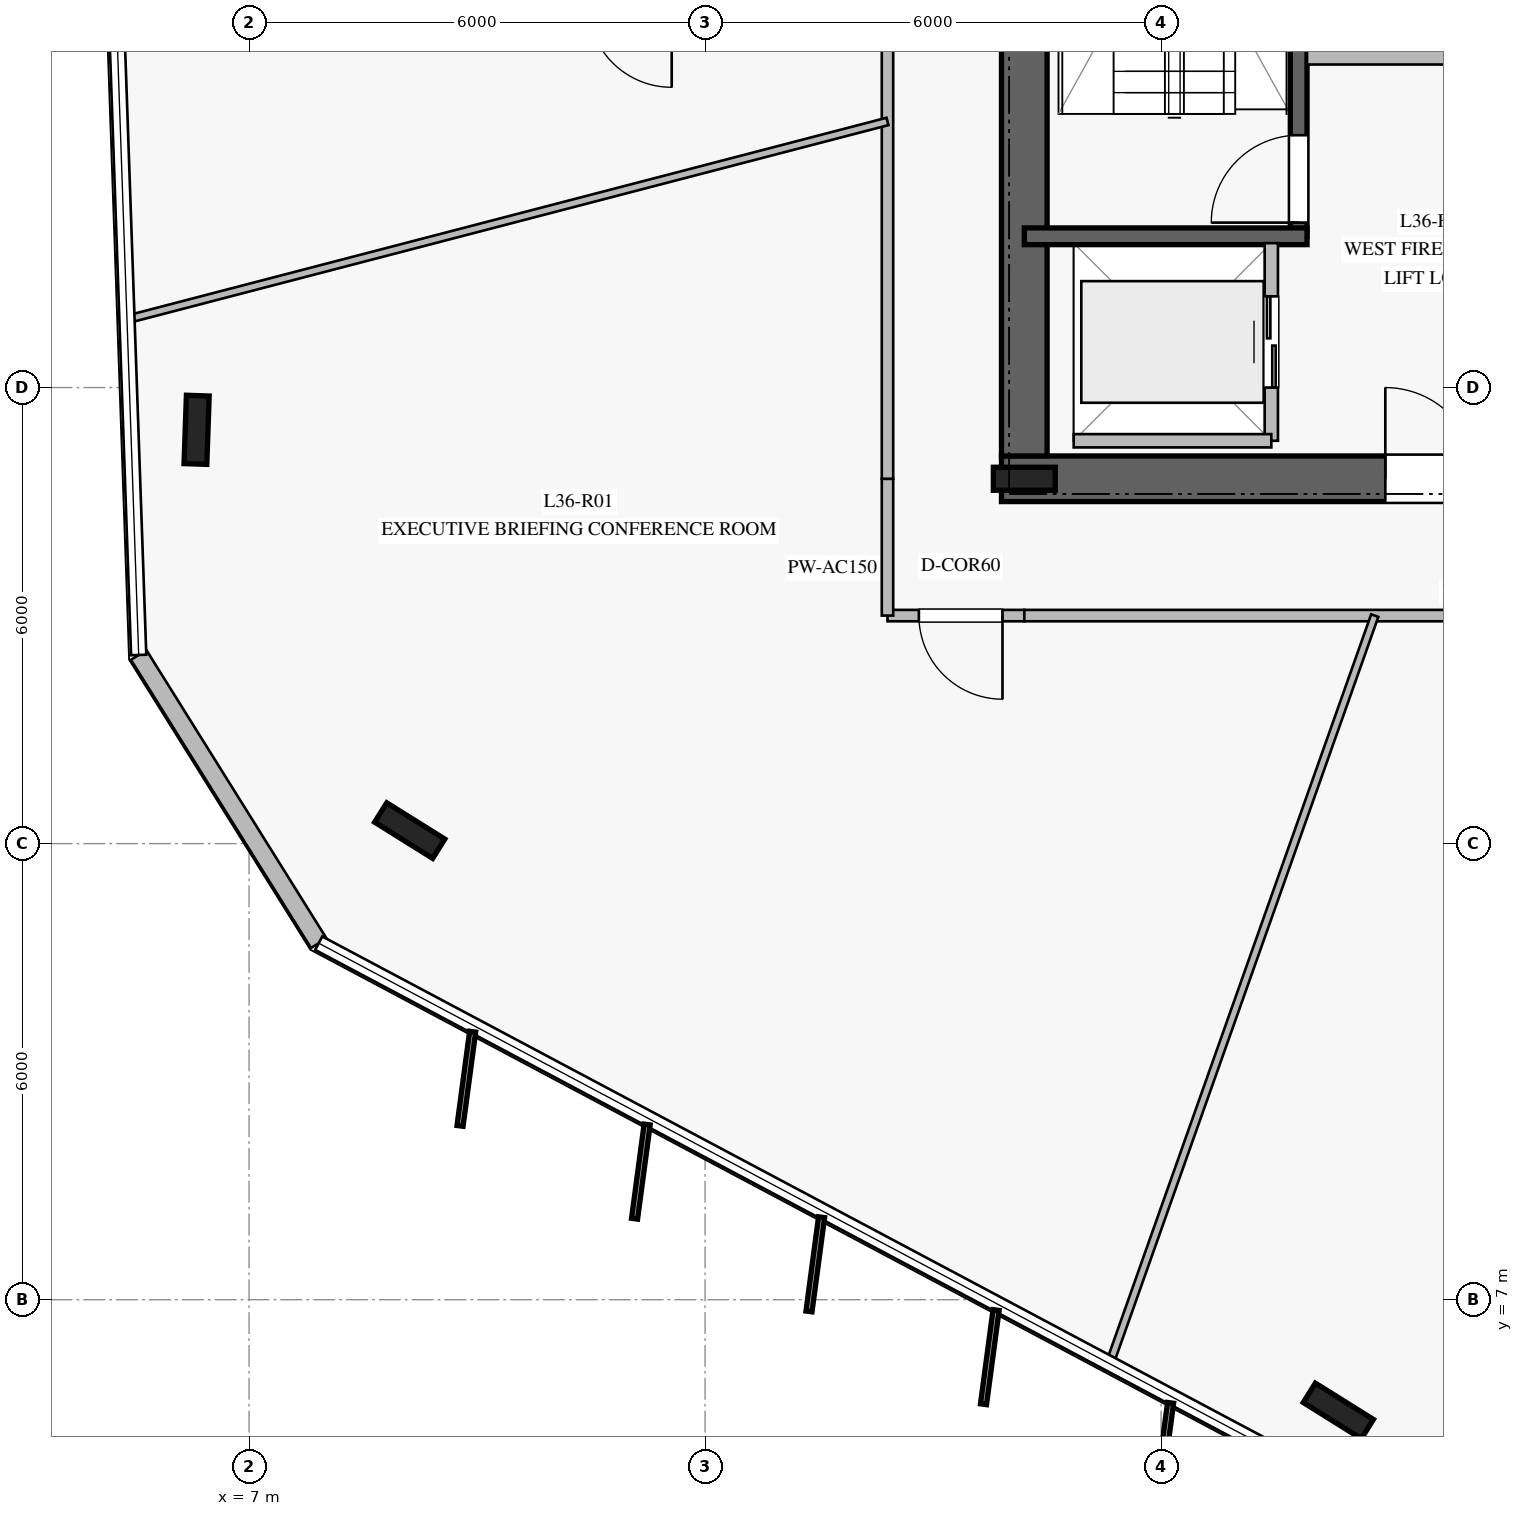
"""IFC4 building model, lengths in metres.
Left out: names, types, materials, properties, quantities, classifications, styles, units other than length and angle.
Written with IfcOpenShell. Run it as: python <this file> out.ifc"""

import sys

from ifc_helpers import new_model, si_unit, direction, frame, frame_2d, origin, origin_2d, place, context, subcontext, project, spatial, rectangle, i_section, extrude, element, fill, save


model = new_model("IFC4")
c1 = context("Model", 3, precision=1e-05, world=origin(), true_north=direction((0.0, 1.0)))
c2 = subcontext(c1, "Body", "Model", "MODEL_VIEW")
j1 = project(units=[si_unit("LENGTHUNIT", "METRE"), si_unit("PLANEANGLEUNIT", "RADIAN")], contexts=[c1])
p1 = place(None, origin())
s1 = spatial("IfcSite", under=j1, at=p1, CompositionType="ELEMENT")
p2 = place(p1, origin())
s2 = spatial("IfcBuilding", under=s1, at=p2, CompositionType="ELEMENT")
p3 = place(p2, frame((0.0, 0.0, 150.4)))
s3 = spatial("IfcBuildingStorey", under=s2, at=p3, CompositionType="ELEMENT", Elevation=150.4)
p4 = place(p3, frame((16.9, 17.8, 0.0), z_axis=(0.0, 0.0, 1.0), x_axis=(1.0, 0.0, 0.0)))
e1 = element("IfcWall", 1, at=p4, inside=s3, PredefinedType="SHEAR", context=c2, shape_type="SweptSolid", body=[
    extrude(rectangle(XDim=16.2, YDim=0.6, at=frame_2d((8.1, 0.0))), origin(), (0.0, 0.0, 1.0), 3.76),
])
p5 = place(p4, frame((5.05, 0.0, 0.0)))
e2 = element("IfcOpeningElement", 2, at=p5, cuts=e1, PredefinedType="OPENING", context=c2, shape_type="SweptSolid", body=[
    extrude(rectangle(XDim=1.2, YDim=2.25, at=frame_2d((0.6, 1.125))), frame((0.0, 0.31, 0.0), z_axis=(0.0, -1.0, 0.0), x_axis=(1.0, 0.0, 0.0)), (0.0, 0.0, 1.0), 0.62),
])
p6 = place(p4, frame((10.95, 0.0, 0.0)))
e3 = element("IfcOpeningElement", 3, at=p6, cuts=e1, PredefinedType="OPENING", context=c2, shape_type="SweptSolid", body=[
    extrude(rectangle(XDim=1.1, YDim=2.2, at=frame_2d((0.55, 1.1))), frame((0.0, 0.31, 0.0), z_axis=(0.0, -1.0, 0.0), x_axis=(1.0, 0.0, 0.0)), (0.0, 0.0, 1.0), 0.62),
])
p7 = place(p3, frame((17.2, 31.9, 0.0), z_axis=(0.0, 0.0, 1.0), x_axis=(0.0, -1.0, 0.0)))
e4 = element("IfcWall", 4, at=p7, inside=s3, PredefinedType="SHEAR", context=c2, shape_type="SweptSolid", body=[
    extrude(rectangle(XDim=13.8, YDim=0.6, at=frame_2d((6.9, 0.0))), origin(), (0.0, 0.0, 1.0), 3.76),
])
p8 = place(p7, frame((2.05, 0.0, 0.0)))
e5 = element("IfcOpeningElement", 5, at=p8, cuts=e4, PredefinedType="OPENING", context=c2, shape_type="SweptSolid", body=[
    extrude(rectangle(XDim=1.5, YDim=2.2, at=frame_2d((0.75, 1.1))), frame((0.0, 0.31, 0.0), z_axis=(0.0, -1.0, 0.0), x_axis=(1.0, 0.0, 0.0)), (0.0, 0.0, 1.0), 0.62),
])
p9 = place(p3, frame((17.2, 17.8, 0.0), z_axis=(0.0, 0.0, 1.0), x_axis=(1.0, 0.0, 0.0)))
e6 = element("IfcColumn", 6, at=p9, inside=s3, PredefinedType="COLUMN", context=c2, shape_type="SweptSolid", body=[
    extrude(i_section(OverallWidth=0.303, OverallDepth=0.814, WebThickness=0.021, FlangeThickness=0.04, at=origin_2d()), origin(), (0.0, 0.0, 1.0), 4.0),
])
p10 = place(p3, frame((20.81, 20.99, 0.0), z_axis=(0.0, 0.0, 1.0), x_axis=(0.0, 1.0, 0.0)))
e7 = element("IfcWall", 7, at=p10, inside=s3, PredefinedType="SOLIDWALL", context=c2, shape_type="SweptSolid", body=[
    extrude(rectangle(XDim=7.22, YDim=0.22, at=frame_2d((3.61, 0.0))), origin(), (0.0, 0.0, 1.0), 3.76),
])
p11 = place(p10, frame((0.18, 0.0, 0.0)))
e8 = element("IfcOpeningElement", 8, at=p11, cuts=e7, PredefinedType="OPENING", context=c2, shape_type="SweptSolid", body=[
    extrude(rectangle(XDim=1.15, YDim=2.2, at=frame_2d((0.575, 1.1))), frame((0.0, 0.12, 0.0), z_axis=(0.0, -1.0, 0.0), x_axis=(1.0, 0.0, 0.0)), (0.0, 0.0, 1.0), 0.24),
])
p12 = place(p3, frame((17.2, 20.99, 0.0), z_axis=(0.0, 0.0, 1.0), x_axis=(1.0, 0.0, 0.0)))
e9 = element("IfcWall", 9, at=p12, inside=s3, PredefinedType="SOLIDWALL", context=c2, shape_type="SweptSolid", body=[
    extrude(rectangle(XDim=3.72, YDim=0.22, at=frame_2d((1.86, 0.0))), origin(), (0.0, 0.0, 1.0), 3.76),
])
for number, where, z_axis, x_axis in (
    (10, (6.31, 18.444, 0.0), (0.0, 0.0, 1.0), (0.035, 0.999, 0.0)),
    (11, (9.114, 13.171, 0.0), (0.0, 0.0, 1.0), (-0.848, 0.53, 0.0)),
    (12, (21.332, 5.536, 0.0), (0.0, 0.0, 1.0), (-0.848, 0.53, 0.0)),
):
    element("IfcColumn", number, at=place(p3, frame(where, z_axis=z_axis, x_axis=x_axis)), inside=s3, PredefinedType="COLUMN", context=c2, shape_type="SweptSolid", body=[
        extrude(i_section(OverallWidth=0.3, OverallDepth=0.9, WebThickness=0.019, FlangeThickness=0.035, at=origin_2d()), origin(), (0.0, 0.0, 1.0), 4.0),
    ])
p13 = place(p3, frame((5.548, 15.482, 0.0), z_axis=(0.0, 0.0, 1.0), x_axis=(0.529822232534, -0.848108720573, 0.0)))
e13 = element("IfcWall", 13, at=p13, inside=s3, PredefinedType="STANDARD", context=c2, shape_type="SweptSolid", body=[
    extrude(rectangle(XDim=4.471, YDim=0.24, at=frame_2d((2.236, 0.0))), origin(), (0.0, 0.0, 1.0), 3.76),
])
p14 = place(p3, frame((20.92, 23.35, 0.0), z_axis=(0.0, 0.0, 1.0), x_axis=(1.0, 0.0, 0.0)))
e14 = element("IfcWall", 14, at=p14, inside=s3, PredefinedType="PARTITIONING", context=c2, shape_type="SweptSolid", body=[
    extrude(rectangle(XDim=3.38, YDim=0.2, at=frame_2d((1.69, 0.0))), origin(), (0.0, 0.0, 1.0), 3.76),
])
p15 = place(p3, frame((20.45, 18.3, 0.0), z_axis=(0.0, 0.0, 1.0), x_axis=(0.0, 1.0, 0.0)))
e15 = element("IfcWall", 15, at=p15, inside=s3, PredefinedType="PARTITIONING", context=c2, shape_type="SweptSolid", body=[
    extrude(rectangle(XDim=2.6, YDim=0.175, at=frame_2d((1.3, 0.0))), origin(), (0.0, 0.0, 1.0), 3.76),
])
p16 = place(p15, frame((0.7, 0.0, 0.0)))
e16 = element("IfcOpeningElement", 16, at=p16, cuts=e15, PredefinedType="OPENING", context=c2, shape_type="SweptSolid", body=[
    extrude(rectangle(XDim=1.2, YDim=2.2, at=frame_2d((0.6, 1.1))), frame((0.0, 0.098, 0.0), z_axis=(0.0, -1.0, 0.0), x_axis=(1.0, 0.0, 0.0)), (0.0, 0.0, 1.0), 0.195),
])
p17 = place(p3, frame((17.85, 18.3, 0.0), z_axis=(0.0, 0.0, 1.0), x_axis=(1.0, 0.0, 0.0)))
e17 = element("IfcWall", 17, at=p17, inside=s3, PredefinedType="PARTITIONING", context=c2, shape_type="SweptSolid", body=[
    extrude(rectangle(XDim=2.6, YDim=0.175, at=frame_2d((1.3, 0.0))), origin(), (0.0, 0.0, 1.0), 3.76),
])
p18 = place(p3, frame((17.2, 16.0, 0.0), z_axis=(0.0, 0.0, 1.0), x_axis=(-1.0, 0.0, 0.0)))
e18 = element("IfcWall", 18, at=p18, inside=s3, PredefinedType="PARTITIONING", context=c2, shape_type="SweptSolid", body=[
    extrude(rectangle(XDim=1.8, YDim=0.15, at=frame_2d((0.9, 0.0))), origin(), (0.0, 0.0, 1.0), 3.36),
])
p19 = place(p18, frame((0.287, 0.0, 0.0)))
e19 = element("IfcOpeningElement", 19, at=p19, cuts=e18, PredefinedType="OPENING", context=c2, shape_type="SweptSolid", body=[
    extrude(rectangle(XDim=1.1, YDim=2.2, at=frame_2d((0.55, 1.1))), frame((0.0, 0.085, 0.0), z_axis=(0.0, -1.0, 0.0), x_axis=(1.0, 0.0, 0.0)), (0.0, 0.0, 1.0), 0.17),
])
p20 = place(p3, frame((15.4, 16.0, 0.0), z_axis=(0.0, 0.0, 1.0), x_axis=(0.0, 1.0, 0.0)))
e20 = element("IfcWall", 20, at=p20, inside=s3, PredefinedType="PARTITIONING", context=c2, shape_type="SweptSolid", body=[
    extrude(rectangle(XDim=1.8, YDim=0.15, at=frame_2d((0.9, 0.0))), origin(), (0.0, 0.0, 1.0), 3.21),
])
p21 = place(p3, frame((15.4, 17.8, 0.0), z_axis=(0.0, 0.0, 1.0), x_axis=(0.0, 1.0, 0.0)))
e21 = element("IfcWall", 21, at=p21, inside=s3, PredefinedType="PARTITIONING", context=c2, shape_type="SweptSolid", body=[
    extrude(rectangle(XDim=6.25, YDim=0.15, at=frame_2d((3.125, 0.0))), origin(), (0.0, 0.0, 1.0), 3.21),
])
p22 = place(p3, frame((24.05, 16.0, 0.0), z_axis=(0.0, 0.0, 1.0), x_axis=(-1.0, 0.0, 0.0)))
e22 = element("IfcWall", 22, at=p22, inside=s3, PredefinedType="PARTITIONING", context=c2, shape_type="SweptSolid", body=[
    extrude(rectangle(XDim=6.85, YDim=0.15, at=frame_2d((3.425, 0.0))), origin(), (0.0, 0.0, 1.0), 3.21),
])
p23 = place(p3, frame((15.4, 22.501, 0.0), z_axis=(0.0, 0.0, 1.0), x_axis=(-0.96772970211, -0.251990522945, 0.0)))
e23 = element("IfcWall", 23, at=p23, inside=s3, PredefinedType="MOVABLE", context=c2, shape_type="SweptSolid", body=[
    extrude(rectangle(XDim=10.322, YDim=0.1, at=frame_2d((5.161, 0.0))), origin(), (0.0, 0.0, 1.0), 3.05),
])
p24 = place(p3, frame((21.811, 16.0, 0.0), z_axis=(0.0, 0.0, 1.0), x_axis=(-0.333981087617, -0.942579775464, 0.0)))
e24 = element("IfcWall", 24, at=p24, inside=s3, PredefinedType="MOVABLE", context=c2, shape_type="SweptSolid", body=[
    extrude(rectangle(XDim=10.426, YDim=0.1, at=frame_2d((5.213, 0.0))), origin(), (0.0, 0.0, 1.0), 3.16),
])
p25 = place(p11, origin())
e25 = element("IfcDoor", 25, at=p25, inside=s3, OperationType="SINGLE_SWING_LEFT", PredefinedType="DOOR", context=c2, shape_type="SweptSolid", body=[
    extrude(rectangle(XDim=1.15, YDim=2.2, at=frame_2d((0.575, 1.1))), frame((0.0, 0.025, 0.0), z_axis=(0.0, -1.0, 0.0), x_axis=(1.0, 0.0, 0.0)), (0.0, 0.0, 1.0), 0.05),
])
fill(e8, e25)
p26 = place(p5, origin())
e26 = element("IfcDoor", 26, at=p26, inside=s3, OperationType="SINGLE_SWING_LEFT", PredefinedType="DOOR", context=c2, shape_type="SweptSolid", body=[
    extrude(rectangle(XDim=1.2, YDim=2.25, at=frame_2d((0.6, 1.125))), frame((0.0, 0.025, 0.0), z_axis=(0.0, -1.0, 0.0), x_axis=(1.0, 0.0, 0.0)), (0.0, 0.0, 1.0), 0.05),
])
fill(e2, e26)
p27 = place(p16, origin())
e27 = element("IfcDoor", 27, at=p27, inside=s3, OperationType="DOUBLE_DOOR_SLIDING", PredefinedType="DOOR", context=c2, shape_type="SweptSolid", body=[
    extrude(rectangle(XDim=1.2, YDim=2.2, at=frame_2d((0.6, 1.1))), frame((0.0, 0.025, 0.0), z_axis=(0.0, -1.0, 0.0), x_axis=(1.0, 0.0, 0.0)), (0.0, 0.0, 1.0), 0.05),
])
fill(e16, e27)
p28 = place(p19, origin())
e28 = element("IfcDoor", 28, at=p28, inside=s3, OperationType="SINGLE_SWING_LEFT", PredefinedType="DOOR", context=c2, shape_type="SweptSolid", body=[
    extrude(rectangle(XDim=1.1, YDim=2.2, at=frame_2d((0.55, 1.1))), frame((0.0, 0.025, 0.0), z_axis=(0.0, -1.0, 0.0), x_axis=(1.0, 0.0, 0.0)), (0.0, 0.0, 1.0), 0.05),
])
fill(e19, e28)
save(model, sys.argv[1])
